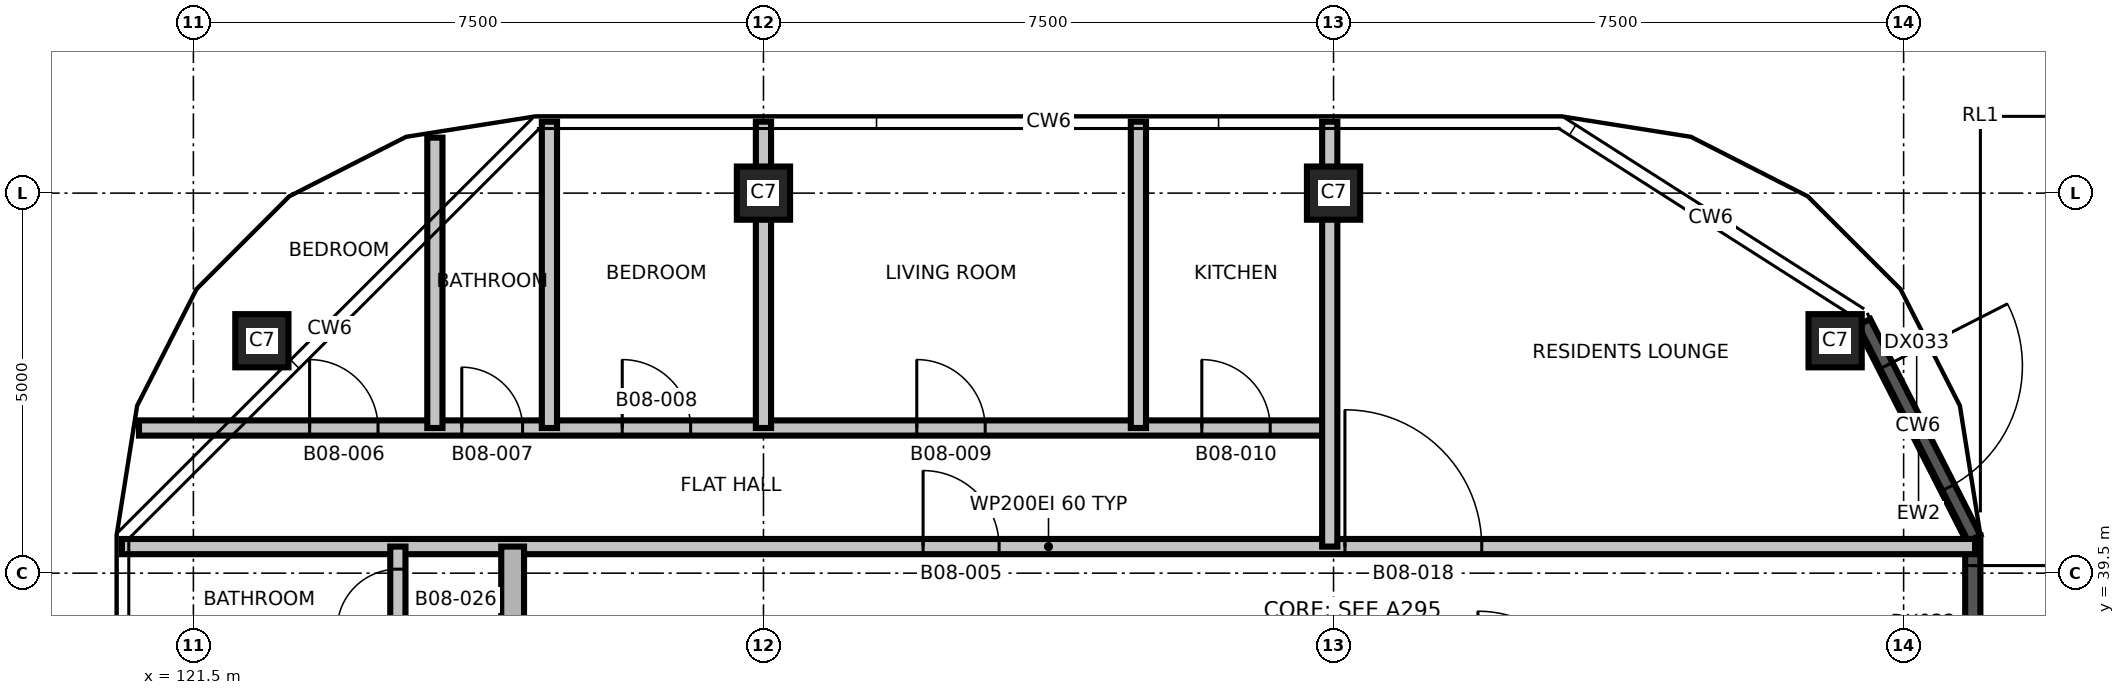
"""IFC4 building model, lengths in metres.
Left out: names, types, materials, properties, quantities, classifications, styles, units other than length and angle.
Written with IfcOpenShell. Run it as: python <this file> out.ifc"""

import sys

from ifc_helpers import new_model, si_unit, direction, frame, frame_2d, origin, origin_2d, place, context, subcontext, project, spatial, rectangle, extrude, element, fill, save


model = new_model("IFC4")
c1 = context("Model", 3, precision=1e-05, world=origin(), true_north=direction((0.0, 1.0)))
c2 = subcontext(c1, "Body", "Model", "MODEL_VIEW")
j1 = project(units=[si_unit("LENGTHUNIT", "METRE"), si_unit("PLANEANGLEUNIT", "RADIAN")], contexts=[c1])
p1 = place(None, origin())
s1 = spatial("IfcSite", under=j1, at=p1, CompositionType="ELEMENT")
p2 = place(p1, origin())
s2 = spatial("IfcBuilding", under=s1, at=p2, CompositionType="ELEMENT")
p3 = place(p2, frame((0.0, 0.0, 94.5)))
s3 = spatial("IfcBuildingStorey", under=s2, at=p3, CompositionType="ELEMENT", Elevation=94.5)
for number, where, z_axis, x_axis in (
    (1, (122.401, 42.558, 0.0), (0.0, 0.0, 1.0), (1.0, 0.0, 0.0)),
    (2, (143.099, 42.558, 0.0), (0.0, 0.0, 1.0), (1.0, 0.0, 0.0)),
    (3, (129.0, 44.5, 0.0), (0.0, 0.0, 1.0), (1.0, 0.0, 0.0)),
    (4, (136.5, 44.5, 0.0), (0.0, 0.0, 1.0), (1.0, 0.0, 0.0)),
):
    element("IfcColumn", number, at=place(p3, frame(where, z_axis=z_axis, x_axis=x_axis)), inside=s3, PredefinedType="COLUMN", context=c2, shape_type="SweptSolid", body=[
        extrude(rectangle(XDim=0.7, YDim=0.7, at=origin_2d()), origin(), (0.0, 0.0, 1.0), 3.7),
    ])
p4 = place(p3, frame((144.91, 40.0, 0.0), z_axis=(0.0, 0.0, 1.0), x_axis=(0.0, -1.0, 0.0)))
e5 = element("IfcWall", 5, at=p4, inside=s3, PredefinedType="SOLIDWALL", context=c2, shape_type="SweptSolid", body=[
    extrude(rectangle(XDim=3.15, YDim=0.2, at=frame_2d((1.575, 0.0))), origin(), (0.0, 0.0, 1.0), 3.4),
])
p5 = place(p4, frame((0.4, 0.0, 0.0)))
e6 = element("IfcOpeningElement", 6, at=p5, cuts=e5, PredefinedType="OPENING", context=c2, shape_type="SweptSolid", body=[
    extrude(rectangle(XDim=1.5, YDim=2.4, at=frame_2d((0.75, 1.2))), frame((0.0, 0.11, 0.0), z_axis=(0.0, -1.0, 0.0), x_axis=(1.0, 0.0, 0.0)), (0.0, 0.0, 1.0), 0.22),
])
p6 = place(p3, frame((143.472, 42.799, 0.0), z_axis=(0.0, 0.0, 1.0), x_axis=(0.453962447346, -0.89102081704, 0.0)))
e7 = element("IfcWall", 7, at=p6, inside=s3, PredefinedType="SOLIDWALL", context=c2, shape_type="SweptSolid", body=[
    extrude(rectangle(XDim=3.192, YDim=0.2, at=frame_2d((1.596, 0.0))), origin(), (0.0, 0.0, 1.0), 3.4),
])
p7 = place(p6, frame((0.642, 0.0, 0.0)))
e8 = element("IfcOpeningElement", 8, at=p7, cuts=e7, PredefinedType="OPENING", context=c2, shape_type="SweptSolid", body=[
    extrude(rectangle(XDim=1.8, YDim=2.4, at=frame_2d((0.9, 1.2))), frame((0.0, 0.11, 0.0), z_axis=(0.0, -1.0, 0.0), x_axis=(1.0, 0.0, 0.0)), (0.0, 0.0, 1.0), 0.22),
])
p8 = place(p3, frame((120.56, 39.85, 0.0), z_axis=(0.0, 0.0, 1.0), x_axis=(1.0, 0.0, 0.0)))
e9 = element("IfcWall", 9, at=p8, inside=s3, PredefinedType="PARTITIONING", context=c2, shape_type="SweptSolid", body=[
    extrude(rectangle(XDim=24.38, YDim=0.2, at=frame_2d((12.19, 0.0))), origin(), (0.0, 0.0, 1.0), 3.4),
])
p9 = place(p8, frame((10.54, 0.0, 0.0)))
e10 = element("IfcOpeningElement", 10, at=p9, cuts=e9, PredefinedType="OPENING", context=c2, shape_type="SweptSolid", body=[
    extrude(rectangle(XDim=1.0, YDim=2.1, at=frame_2d((0.5, 1.05))), frame((0.0, 0.11, 0.0), z_axis=(0.0, -1.0, 0.0), x_axis=(1.0, 0.0, 0.0)), (0.0, 0.0, 1.0), 0.22),
])
p10 = place(p8, frame((16.09, 0.0, 0.0)))
e11 = element("IfcOpeningElement", 11, at=p10, cuts=e9, PredefinedType="OPENING", context=c2, shape_type="SweptSolid", body=[
    extrude(rectangle(XDim=1.8, YDim=2.1, at=frame_2d((0.9, 1.05))), frame((0.0, 0.11, 0.0), z_axis=(0.0, -1.0, 0.0), x_axis=(1.0, 0.0, 0.0)), (0.0, 0.0, 1.0), 0.22),
])
p11 = place(p3, frame((120.784, 41.41, 0.0), z_axis=(0.0, 0.0, 1.0), x_axis=(1.0, 0.0, 0.0)))
e12 = element("IfcWall", 12, at=p11, inside=s3, PredefinedType="PARTITIONING", context=c2, shape_type="SweptSolid", body=[
    extrude(rectangle(XDim=15.716, YDim=0.2, at=frame_2d((7.858, 0.0))), origin(), (0.0, 0.0, 1.0), 3.4),
])
p12 = place(p11, frame((2.245, 0.0, 0.0)))
e13 = element("IfcOpeningElement", 13, at=p12, cuts=e12, PredefinedType="OPENING", context=c2, shape_type="SweptSolid", body=[
    extrude(rectangle(XDim=0.9, YDim=2.1, at=frame_2d((0.45, 1.05))), frame((0.0, 0.11, 0.0), z_axis=(0.0, -1.0, 0.0), x_axis=(1.0, 0.0, 0.0)), (0.0, 0.0, 1.0), 0.22),
])
p13 = place(p11, frame((4.247, 0.0, 0.0)))
e14 = element("IfcOpeningElement", 14, at=p13, cuts=e12, PredefinedType="OPENING", context=c2, shape_type="SweptSolid", body=[
    extrude(rectangle(XDim=0.8, YDim=2.1, at=frame_2d((0.4, 1.05))), frame((0.0, 0.11, 0.0), z_axis=(0.0, -1.0, 0.0), x_axis=(1.0, 0.0, 0.0)), (0.0, 0.0, 1.0), 0.22),
])
p14 = place(p11, frame((6.358, 0.0, 0.0)))
e15 = element("IfcOpeningElement", 15, at=p14, cuts=e12, PredefinedType="OPENING", context=c2, shape_type="SweptSolid", body=[
    extrude(rectangle(XDim=0.9, YDim=2.1, at=frame_2d((0.45, 1.05))), frame((0.0, 0.11, 0.0), z_axis=(0.0, -1.0, 0.0), x_axis=(1.0, 0.0, 0.0)), (0.0, 0.0, 1.0), 0.22),
])
p15 = place(p11, frame((10.233, 0.0, 0.0)))
e16 = element("IfcOpeningElement", 16, at=p15, cuts=e12, PredefinedType="OPENING", context=c2, shape_type="SweptSolid", body=[
    extrude(rectangle(XDim=0.9, YDim=2.1, at=frame_2d((0.45, 1.05))), frame((0.0, 0.11, 0.0), z_axis=(0.0, -1.0, 0.0), x_axis=(1.0, 0.0, 0.0)), (0.0, 0.0, 1.0), 0.22),
])
p16 = place(p11, frame((13.983, 0.0, 0.0)))
e17 = element("IfcOpeningElement", 17, at=p16, cuts=e12, PredefinedType="OPENING", context=c2, shape_type="SweptSolid", body=[
    extrude(rectangle(XDim=0.9, YDim=2.1, at=frame_2d((0.45, 1.05))), frame((0.0, 0.11, 0.0), z_axis=(0.0, -1.0, 0.0), x_axis=(1.0, 0.0, 0.0)), (0.0, 0.0, 1.0), 0.22),
])
p17 = place(p3, frame((124.19, 22.15, 0.0), z_axis=(0.0, 0.0, 1.0), x_axis=(0.0, 1.0, 0.0)))
e18 = element("IfcWall", 18, at=p17, inside=s3, PredefinedType="PARTITIONING", context=c2, shape_type="SweptSolid", body=[
    extrude(rectangle(XDim=17.7, YDim=0.2, at=frame_2d((8.85, 0.0))), origin(), (0.0, 0.0, 1.0), 3.4),
])
p18 = place(p17, frame((1.028, 0.0, 0.0)))
e19 = element("IfcOpeningElement", 19, at=p18, cuts=e18, PredefinedType="OPENING", context=c2, shape_type="SweptSolid", body=[
    extrude(rectangle(XDim=0.9, YDim=2.1, at=frame_2d((0.45, 1.05))), frame((0.0, 0.11, 0.0), z_axis=(0.0, -1.0, 0.0), x_axis=(1.0, 0.0, 0.0)), (0.0, 0.0, 1.0), 0.22),
])
p19 = place(p17, frame((3.253, 0.0, 0.0)))
e20 = element("IfcOpeningElement", 20, at=p19, cuts=e18, PredefinedType="OPENING", context=c2, shape_type="SweptSolid", body=[
    extrude(rectangle(XDim=0.8, YDim=2.1, at=frame_2d((0.4, 1.05))), frame((0.0, 0.11, 0.0), z_axis=(0.0, -1.0, 0.0), x_axis=(1.0, 0.0, 0.0)), (0.0, 0.0, 1.0), 0.22),
])
p20 = place(p17, frame((6.195, 0.0, 0.0)))
e21 = element("IfcOpeningElement", 21, at=p20, cuts=e18, PredefinedType="OPENING", context=c2, shape_type="SweptSolid", body=[
    extrude(rectangle(XDim=0.9, YDim=2.1, at=frame_2d((0.45, 1.05))), frame((0.0, 0.11, 0.0), z_axis=(0.0, -1.0, 0.0), x_axis=(1.0, 0.0, 0.0)), (0.0, 0.0, 1.0), 0.22),
])
p21 = place(p17, frame((9.641, 0.0, 0.0)))
e22 = element("IfcOpeningElement", 22, at=p21, cuts=e18, PredefinedType="OPENING", context=c2, shape_type="SweptSolid", body=[
    extrude(rectangle(XDim=0.9, YDim=2.1, at=frame_2d((0.45, 1.05))), frame((0.0, 0.11, 0.0), z_axis=(0.0, -1.0, 0.0), x_axis=(1.0, 0.0, 0.0)), (0.0, 0.0, 1.0), 0.22),
])
p22 = place(p17, frame((11.895, 0.0, 0.0)))
e23 = element("IfcOpeningElement", 23, at=p22, cuts=e18, PredefinedType="OPENING", context=c2, shape_type="SweptSolid", body=[
    extrude(rectangle(XDim=0.8, YDim=2.1, at=frame_2d((0.4, 1.05))), frame((0.0, 0.11, 0.0), z_axis=(0.0, -1.0, 0.0), x_axis=(1.0, 0.0, 0.0)), (0.0, 0.0, 1.0), 0.22),
])
p23 = place(p17, frame((14.378, 0.0, 0.0)))
e24 = element("IfcOpeningElement", 24, at=p23, cuts=e18, PredefinedType="OPENING", context=c2, shape_type="SweptSolid", body=[
    extrude(rectangle(XDim=0.9, YDim=2.1, at=frame_2d((0.45, 1.05))), frame((0.0, 0.11, 0.0), z_axis=(0.0, -1.0, 0.0), x_axis=(1.0, 0.0, 0.0)), (0.0, 0.0, 1.0), 0.22),
])
p24 = place(p17, frame((16.603, 0.0, 0.0)))
e25 = element("IfcOpeningElement", 25, at=p24, cuts=e18, PredefinedType="OPENING", context=c2, shape_type="SweptSolid", body=[
    extrude(rectangle(XDim=0.8, YDim=2.1, at=frame_2d((0.4, 1.05))), frame((0.0, 0.11, 0.0), z_axis=(0.0, -1.0, 0.0), x_axis=(1.0, 0.0, 0.0)), (0.0, 0.0, 1.0), 0.22),
])
p25 = place(p3, frame((124.677, 41.41, 0.0), z_axis=(0.0, 0.0, 1.0), x_axis=(0.0, 1.0, 0.0)))
e26 = element("IfcWall", 26, at=p25, inside=s3, PredefinedType="PARTITIONING", context=c2, shape_type="SweptSolid", body=[
    extrude(rectangle(XDim=3.82, YDim=0.2, at=frame_2d((1.91, 0.0))), origin(), (0.0, 0.0, 1.0), 3.4),
])
p26 = place(p3, frame((125.7, 22.15, 0.0), z_axis=(0.0, 0.0, 1.0), x_axis=(0.0, 1.0, 0.0)))
e27 = element("IfcWall", 27, at=p26, inside=s3, PredefinedType="SHEAR", context=c2, shape_type="SweptSolid", body=[
    extrude(rectangle(XDim=17.7, YDim=0.3, at=frame_2d((8.85, 0.0))), origin(), (0.0, 0.0, 1.0), 3.4),
])
p27 = place(p26, frame((2.7, 0.0, 0.0)))
e28 = element("IfcOpeningElement", 28, at=p27, cuts=e27, PredefinedType="OPENING", context=c2, shape_type="SweptSolid", body=[
    extrude(rectangle(XDim=1.0, YDim=2.1, at=frame_2d((0.5, 1.05))), frame((0.0, 0.16, 0.0), z_axis=(0.0, -1.0, 0.0), x_axis=(1.0, 0.0, 0.0)), (0.0, 0.0, 1.0), 0.32),
])
for number, where, z_axis, x_axis in (
    (29, (126.184, 41.41, 0.0), (0.0, 0.0, 1.0), (0.0, 1.0, 0.0)),
    (30, (129.0, 41.41, 0.0), (0.0, 0.0, 1.0), (0.0, 1.0, 0.0)),
    (31, (133.933, 41.41, 0.0), (0.0, 0.0, 1.0), (0.0, 1.0, 0.0)),
):
    element("IfcWall", number, at=place(p3, frame(where, z_axis=z_axis, x_axis=x_axis)), inside=s3, PredefinedType="PARTITIONING", context=c2, shape_type="SweptSolid", body=[
        extrude(rectangle(XDim=4.03, YDim=0.2, at=frame_2d((2.015, 0.0))), origin(), (0.0, 0.0, 1.0), 3.4),
    ])
p28 = place(p3, frame((136.45, 39.85, 0.0), z_axis=(0.0, 0.0, 1.0), x_axis=(0.0, 1.0, 0.0)))
e32 = element("IfcWall", 32, at=p28, inside=s3, PredefinedType="PARTITIONING", context=c2, shape_type="SweptSolid", body=[
    extrude(rectangle(XDim=5.59, YDim=0.2, at=frame_2d((2.795, 0.0))), origin(), (0.0, 0.0, 1.0), 3.4),
])
p29 = place(p5, origin())
e33 = element("IfcDoor", 33, at=p29, inside=s3, OperationType="SINGLE_SWING_LEFT", PredefinedType="DOOR", context=c2, shape_type="SweptSolid", body=[
    extrude(rectangle(XDim=1.5, YDim=2.4, at=frame_2d((0.75, 1.2))), frame((0.0, 0.025, 0.0), z_axis=(0.0, -1.0, 0.0), x_axis=(1.0, 0.0, 0.0)), (0.0, 0.0, 1.0), 0.05),
])
fill(e6, e33)
p30 = place(p7, origin())
e34 = element("IfcDoor", 34, at=p30, inside=s3, OperationType="SINGLE_SWING_LEFT", PredefinedType="DOOR", context=c2, shape_type="SweptSolid", body=[
    extrude(rectangle(XDim=1.8, YDim=2.4, at=frame_2d((0.9, 1.2))), frame((0.0, 0.025, 0.0), z_axis=(0.0, -1.0, 0.0), x_axis=(1.0, 0.0, 0.0)), (0.0, 0.0, 1.0), 0.05),
])
fill(e8, e34)
p31 = place(p9, origin())
e35 = element("IfcDoor", 35, at=p31, inside=s3, OperationType="SINGLE_SWING_LEFT", PredefinedType="DOOR", context=c2, shape_type="SweptSolid", body=[
    extrude(rectangle(XDim=1.0, YDim=2.1, at=frame_2d((0.5, 1.05))), frame((0.0, 0.025, 0.0), z_axis=(0.0, -1.0, 0.0), x_axis=(1.0, 0.0, 0.0)), (0.0, 0.0, 1.0), 0.05),
])
fill(e10, e35)
p32 = place(p12, origin())
e36 = element("IfcDoor", 36, at=p32, inside=s3, OperationType="SINGLE_SWING_RIGHT", PredefinedType="DOOR", context=c2, shape_type="SweptSolid", body=[
    extrude(rectangle(XDim=0.9, YDim=2.1, at=frame_2d((0.45, 1.05))), frame((0.0, 0.025, 0.0), z_axis=(0.0, -1.0, 0.0), x_axis=(1.0, 0.0, 0.0)), (0.0, 0.0, 1.0), 0.05),
])
fill(e13, e36)
p33 = place(p13, origin())
e37 = element("IfcDoor", 37, at=p33, inside=s3, OperationType="SINGLE_SWING_LEFT", PredefinedType="DOOR", context=c2, shape_type="SweptSolid", body=[
    extrude(rectangle(XDim=0.8, YDim=2.1, at=frame_2d((0.4, 1.05))), frame((0.0, 0.025, 0.0), z_axis=(0.0, -1.0, 0.0), x_axis=(1.0, 0.0, 0.0)), (0.0, 0.0, 1.0), 0.05),
])
fill(e14, e37)
p34 = place(p14, origin())
e38 = element("IfcDoor", 38, at=p34, inside=s3, OperationType="SINGLE_SWING_RIGHT", PredefinedType="DOOR", context=c2, shape_type="SweptSolid", body=[
    extrude(rectangle(XDim=0.9, YDim=2.1, at=frame_2d((0.45, 1.05))), frame((0.0, 0.025, 0.0), z_axis=(0.0, -1.0, 0.0), x_axis=(1.0, 0.0, 0.0)), (0.0, 0.0, 1.0), 0.05),
])
fill(e15, e38)
p35 = place(p15, origin())
e39 = element("IfcDoor", 39, at=p35, inside=s3, OperationType="SINGLE_SWING_LEFT", PredefinedType="DOOR", context=c2, shape_type="SweptSolid", body=[
    extrude(rectangle(XDim=0.9, YDim=2.1, at=frame_2d((0.45, 1.05))), frame((0.0, 0.025, 0.0), z_axis=(0.0, -1.0, 0.0), x_axis=(1.0, 0.0, 0.0)), (0.0, 0.0, 1.0), 0.05),
])
fill(e16, e39)
p36 = place(p16, origin())
e40 = element("IfcDoor", 40, at=p36, inside=s3, OperationType="SINGLE_SWING_RIGHT", PredefinedType="DOOR", context=c2, shape_type="SweptSolid", body=[
    extrude(rectangle(XDim=0.9, YDim=2.1, at=frame_2d((0.45, 1.05))), frame((0.0, 0.025, 0.0), z_axis=(0.0, -1.0, 0.0), x_axis=(1.0, 0.0, 0.0)), (0.0, 0.0, 1.0), 0.05),
])
fill(e17, e40)
p37 = place(p10, origin())
e41 = element("IfcDoor", 41, at=p37, inside=s3, OperationType="SINGLE_SWING_RIGHT", PredefinedType="DOOR", context=c2, shape_type="SweptSolid", body=[
    extrude(rectangle(XDim=1.8, YDim=2.1, at=frame_2d((0.9, 1.05))), frame((0.0, 0.025, 0.0), z_axis=(0.0, -1.0, 0.0), x_axis=(1.0, 0.0, 0.0)), (0.0, 0.0, 1.0), 0.05),
])
fill(e11, e41)
p38 = place(p24, origin())
e42 = element("IfcDoor", 42, at=p38, inside=s3, OperationType="SINGLE_SWING_RIGHT", PredefinedType="DOOR", context=c2, shape_type="SweptSolid", body=[
    extrude(rectangle(XDim=0.8, YDim=2.1, at=frame_2d((0.4, 1.05))), frame((0.0, 0.025, 0.0), z_axis=(0.0, -1.0, 0.0), x_axis=(1.0, 0.0, 0.0)), (0.0, 0.0, 1.0), 0.05),
])
fill(e25, e42)
save(model, sys.argv[1])
